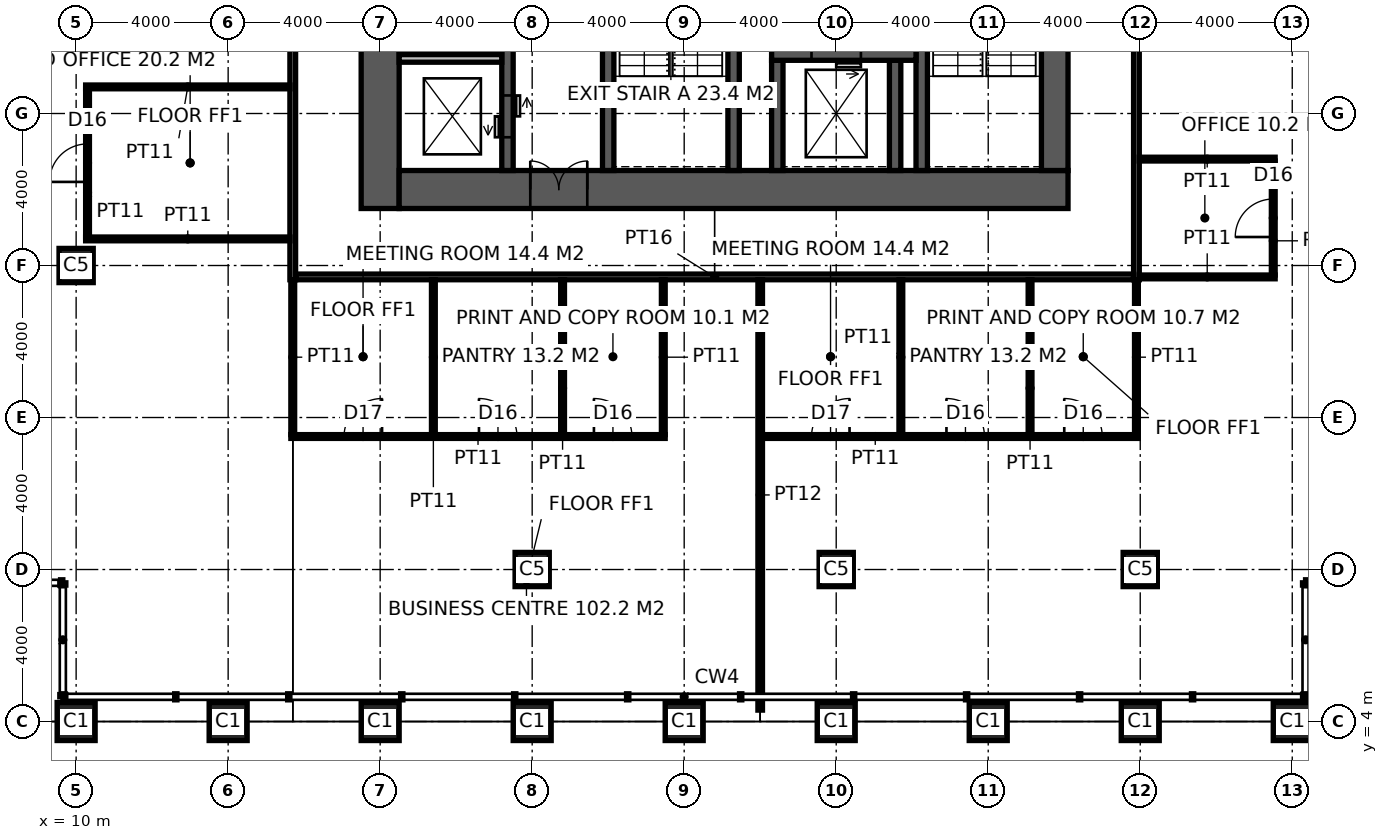
"""IFC4 building model, lengths in metres.
Left out: names, types, materials, properties, quantities, classifications, styles, units other than length and angle.
Written with IfcOpenShell. Run it as: python <this file> out.ifc"""

import sys

from ifc_helpers import new_model, si_unit, direction, frame, frame_2d, origin, origin_2d, place, context, subcontext, project, spatial, rectangle, hollow_rectangle, extrude, element, fill, save


model = new_model("IFC4")
c1 = context("Model", 3, precision=1e-05, world=origin(), true_north=direction((0.0, 1.0)))
c2 = subcontext(c1, "Body", "Model", "MODEL_VIEW")
j1 = project(units=[si_unit("LENGTHUNIT", "METRE"), si_unit("PLANEANGLEUNIT", "RADIAN")], contexts=[c1])
p1 = place(None, origin())
s1 = spatial("IfcSite", under=j1, at=p1, CompositionType="ELEMENT")
p2 = place(p1, origin())
s2 = spatial("IfcBuilding", under=s1, at=p2, CompositionType="ELEMENT")
p3 = place(p2, frame((0.0, 0.0, 142.8)))
s3 = spatial("IfcBuildingStorey", under=s2, at=p3, CompositionType="ELEMENT", Elevation=142.8)
for number, where, z_axis, x_axis in (
    (1, (10.0, 4.0, 0.0), (0.0, 0.0, 1.0), (1.0, 0.0, 0.0)),
    (2, (14.0, 4.0, 0.0), (0.0, 0.0, 1.0), (1.0, 0.0, 0.0)),
    (3, (18.0, 4.0, 0.0), (0.0, 0.0, 1.0), (1.0, 0.0, 0.0)),
    (4, (22.0, 4.0, 0.0), (0.0, 0.0, 1.0), (1.0, 0.0, 0.0)),
    (5, (26.0, 4.0, 0.0), (0.0, 0.0, 1.0), (1.0, 0.0, 0.0)),
    (6, (30.0, 4.0, 0.0), (0.0, 0.0, 1.0), (1.0, 0.0, 0.0)),
    (7, (34.0, 4.0, 0.0), (0.0, 0.0, 1.0), (1.0, 0.0, 0.0)),
    (8, (38.0, 4.0, 0.0), (0.0, 0.0, 1.0), (1.0, 0.0, 0.0)),
    (9, (42.0, 4.0, 0.0), (0.0, 0.0, 1.0), (1.0, 0.0, 0.0)),
):
    element("IfcColumn", number, at=place(p3, frame(where, z_axis=z_axis, x_axis=x_axis)), inside=s3, PredefinedType="COLUMN", context=c2, shape_type="SweptSolid", body=[
        extrude(hollow_rectangle(XDim=1.0, YDim=1.0, WallThickness=0.1, at=origin_2d()), origin(), (0.0, 0.0, 1.0), 5.0),
    ])
for number, where, z_axis, x_axis in (
    (10, (10.0, 16.0, 0.0), (0.0, 0.0, 1.0), (1.0, 0.0, 0.0)),
    (11, (22.0, 8.0, 0.0), (0.0, 0.0, 1.0), (1.0, 0.0, 0.0)),
    (12, (30.0, 8.0, 0.0), (0.0, 0.0, 1.0), (1.0, 0.0, 0.0)),
    (13, (38.0, 8.0, 0.0), (0.0, 0.0, 1.0), (1.0, 0.0, 0.0)),
):
    element("IfcColumn", number, at=place(p3, frame(where, z_axis=z_axis, x_axis=x_axis)), inside=s3, PredefinedType="COLUMN", context=c2, shape_type="SweptSolid", body=[
        extrude(hollow_rectangle(XDim=0.9, YDim=0.9, WallThickness=0.1, at=origin_2d()), origin(), (0.0, 0.0, 1.0), 5.0),
    ])
p4 = place(p3, frame((18.0, 17.5, -0.15), z_axis=(0.0, 0.0, 1.0), x_axis=(0.0, 1.0, 0.0)))
e14 = element("IfcWall", 14, at=p4, inside=s3, PredefinedType="SHEAR", context=c2, shape_type="SweptSolid", body=[
    extrude(rectangle(XDim=19.0, YDim=1.0, at=frame_2d((9.5, 0.0))), origin(), (0.0, 0.0, 1.0), 5.0),
])
p5 = place(p3, frame((18.5, 18.0, -0.15), z_axis=(0.0, 0.0, 1.0), x_axis=(1.0, 0.0, 0.0)))
e15 = element("IfcWall", 15, at=p5, inside=s3, PredefinedType="SHEAR", context=c2, shape_type="SweptSolid", body=[
    extrude(rectangle(XDim=17.6, YDim=1.0, at=frame_2d((8.8, 0.0))), origin(), (0.0, 0.0, 1.0), 5.0),
])
p6 = place(p5, frame((3.45, 0.0, 0.15)))
e16 = element("IfcOpeningElement", 16, at=p6, cuts=e15, PredefinedType="OPENING", context=c2, shape_type="SweptSolid", body=[
    extrude(rectangle(XDim=1.5, YDim=2.4, at=frame_2d((0.75, 1.2))), frame((0.0, 0.51, 0.0), z_axis=(0.0, -1.0, 0.0), x_axis=(1.0, 0.0, 0.0)), (0.0, 0.0, 1.0), 1.02),
])
p7 = place(p3, frame((35.75, 18.5, -0.15), z_axis=(0.0, 0.0, 1.0), x_axis=(0.0, 1.0, 0.0)))
e17 = element("IfcWall", 17, at=p7, inside=s3, PredefinedType="SHEAR", context=c2, shape_type="SweptSolid", body=[
    extrude(rectangle(XDim=17.0, YDim=0.7, at=frame_2d((8.5, 0.0))), origin(), (0.0, 0.0, 1.0), 5.0),
])
p8 = place(p7, frame((9.85, 0.0, 0.15)))
e18 = element("IfcOpeningElement", 18, at=p8, cuts=e17, PredefinedType="OPENING", context=c2, shape_type="SweptSolid", body=[
    extrude(rectangle(XDim=1.0, YDim=2.2, at=frame_2d((0.5, 1.1))), frame((0.0, 0.36, 0.0), z_axis=(0.0, -1.0, 0.0), x_axis=(1.0, 0.0, 0.0)), (0.0, 0.0, 1.0), 0.72),
])
p9 = place(p3, frame((24.0, 18.5, -0.15), z_axis=(0.0, 0.0, 1.0), x_axis=(0.0, 1.0, 0.0)))
e19 = element("IfcWall", 19, at=p9, inside=s3, PredefinedType="SHEAR", context=c2, shape_type="SweptSolid", body=[
    extrude(rectangle(XDim=17.0, YDim=0.3, at=frame_2d((8.5, 0.0))), origin(), (0.0, 0.0, 1.0), 5.0),
])
p10 = place(p9, frame((9.6, 0.0, 0.15)))
e20 = element("IfcOpeningElement", 20, at=p10, cuts=e19, PredefinedType="OPENING", context=c2, shape_type="SweptSolid", body=[
    extrude(rectangle(XDim=1.5, YDim=2.4, at=frame_2d((0.75, 1.2))), frame((0.0, 0.16, 0.0), z_axis=(0.0, -1.0, 0.0), x_axis=(1.0, 0.0, 0.0)), (0.0, 0.0, 1.0), 0.32),
])
p11 = place(p3, frame((27.3, 18.5, -0.15), z_axis=(0.0, 0.0, 1.0), x_axis=(0.0, 1.0, 0.0)))
e21 = element("IfcWall", 21, at=p11, inside=s3, PredefinedType="SHEAR", context=c2, shape_type="SweptSolid", body=[
    extrude(rectangle(XDim=7.9, YDim=0.3, at=frame_2d((3.95, 0.0))), origin(), (0.0, 0.0, 1.0), 5.0),
])
p12 = place(p11, frame((6.4, 0.0, 0.15)))
e22 = element("IfcOpeningElement", 22, at=p12, cuts=e21, PredefinedType="OPENING", context=c2, shape_type="SweptSolid", body=[
    extrude(rectangle(XDim=1.0, YDim=2.2, at=frame_2d((0.5, 1.1))), frame((0.0, 0.16, 0.0), z_axis=(0.0, -1.0, 0.0), x_axis=(1.0, 0.0, 0.0)), (0.0, 0.0, 1.0), 0.32),
])
p13 = place(p3, frame((32.25, 18.5, -0.15), z_axis=(0.0, 0.0, 1.0), x_axis=(0.0, 1.0, 0.0)))
e23 = element("IfcWall", 23, at=p13, inside=s3, PredefinedType="SHEAR", context=c2, shape_type="SweptSolid", body=[
    extrude(rectangle(XDim=7.9, YDim=0.3, at=frame_2d((3.95, 0.0))), origin(), (0.0, 0.0, 1.0), 5.0),
])
for number, where, z_axis, x_axis in (
    (24, (28.45, 18.5, -0.15), (0.0, 0.0, 1.0), (0.0, 1.0, 0.0)),
    (25, (31.55, 18.5, -0.15), (0.0, 0.0, 1.0), (0.0, 1.0, 0.0)),
):
    element("IfcWall", number, at=place(p3, frame(where, z_axis=z_axis, x_axis=x_axis)), inside=s3, PredefinedType="SHEAR", context=c2, shape_type="SweptSolid", body=[
        extrude(rectangle(XDim=2.9, YDim=0.3, at=frame_2d((1.45, 0.0))), origin(), (0.0, 0.0, 1.0), 5.0),
    ])
p14 = place(p3, frame((28.3, 21.55, -0.15), z_axis=(0.0, 0.0, 1.0), x_axis=(1.0, 0.0, 0.0)))
e26 = element("IfcWall", 26, at=p14, inside=s3, PredefinedType="SHEAR", context=c2, shape_type="SweptSolid", body=[
    extrude(rectangle(XDim=3.8, YDim=0.3, at=frame_2d((1.9, 0.0))), origin(), (0.0, 0.0, 1.0), 5.0),
])
p15 = place(p14, frame((1.05, 0.0, 0.15)))
e27 = element("IfcOpeningElement", 27, at=p15, cuts=e26, PredefinedType="OPENING", context=c2, shape_type="SweptSolid", body=[
    extrude(rectangle(XDim=1.3, YDim=2.4, at=frame_2d((0.65, 1.2))), frame((0.0, 0.16, 0.0), z_axis=(0.0, -1.0, 0.0), x_axis=(1.0, 0.0, 0.0)), (0.0, 0.0, 1.0), 0.32),
])
p16 = place(p3, frame((21.35, 18.5, -0.15), z_axis=(0.0, 0.0, 1.0), x_axis=(0.0, 1.0, 0.0)))
e28 = element("IfcWall", 28, at=p16, inside=s3, PredefinedType="SHEAR", context=c2, shape_type="SweptSolid", body=[
    extrude(rectangle(XDim=12.5, YDim=0.3, at=frame_2d((6.25, 0.0))), origin(), (0.0, 0.0, 1.0), 5.0),
])
p17 = place(p16, frame((0.875, 0.0, 0.15)))
e29 = element("IfcOpeningElement", 29, at=p17, cuts=e28, PredefinedType="OPENING", context=c2, shape_type="SweptSolid", body=[
    extrude(rectangle(XDim=1.1, YDim=2.2, at=frame_2d((0.55, 1.1))), frame((0.0, 0.16, 0.0), z_axis=(0.0, -1.0, 0.0), x_axis=(1.0, 0.0, 0.0)), (0.0, 0.0, 1.0), 0.32),
])
p18 = place(p16, frame((3.825, 0.0, 0.15)))
e30 = element("IfcOpeningElement", 30, at=p18, cuts=e28, PredefinedType="OPENING", context=c2, shape_type="SweptSolid", body=[
    extrude(rectangle(XDim=1.1, YDim=2.2, at=frame_2d((0.55, 1.1))), frame((0.0, 0.16, 0.0), z_axis=(0.0, -1.0, 0.0), x_axis=(1.0, 0.0, 0.0)), (0.0, 0.0, 1.0), 0.32),
])
p19 = place(p16, frame((6.675, 0.0, 0.15)))
e31 = element("IfcOpeningElement", 31, at=p19, cuts=e28, PredefinedType="OPENING", context=c2, shape_type="SweptSolid", body=[
    extrude(rectangle(XDim=1.1, YDim=2.2, at=frame_2d((0.55, 1.1))), frame((0.0, 0.16, 0.0), z_axis=(0.0, -1.0, 0.0), x_axis=(1.0, 0.0, 0.0)), (0.0, 0.0, 1.0), 0.32),
])
p20 = place(p16, frame((9.575, 0.0, 0.15)))
e32 = element("IfcOpeningElement", 32, at=p20, cuts=e28, PredefinedType="OPENING", context=c2, shape_type="SweptSolid", body=[
    extrude(rectangle(XDim=1.1, YDim=2.2, at=frame_2d((0.55, 1.1))), frame((0.0, 0.16, 0.0), z_axis=(0.0, -1.0, 0.0), x_axis=(1.0, 0.0, 0.0)), (0.0, 0.0, 1.0), 0.32),
])
p21 = place(p3, frame((18.5, 21.45, -0.15), z_axis=(0.0, 0.0, 1.0), x_axis=(1.0, 0.0, 0.0)))
e33 = element("IfcWall", 33, at=p21, inside=s3, PredefinedType="SOLIDWALL", context=c2, shape_type="SweptSolid", body=[
    extrude(rectangle(XDim=2.7, YDim=0.2, at=frame_2d((1.35, 0.0))), origin(), (0.0, 0.0, 1.0), 5.0),
])
p22 = place(p3, frame((15.7, 15.625, 0.0), z_axis=(0.0, 0.0, 1.0), x_axis=(0.0, 1.0, 0.0)))
e34 = element("IfcWall", 34, at=p22, inside=s3, PredefinedType="PARTITIONING", context=c2, shape_type="SweptSolid", body=[
    extrude(rectangle(XDim=22.75, YDim=0.15, at=frame_2d((11.375, 0.0))), origin(), (0.0, 0.0, 1.0), 4.85),
])
p23 = place(p22, frame((10.575, 0.0, 0.0)))
e35 = element("IfcOpeningElement", 35, at=p23, cuts=e34, PredefinedType="OPENING", context=c2, shape_type="SweptSolid", body=[
    extrude(rectangle(XDim=1.6, YDim=2.7, at=frame_2d((0.8, 1.35))), frame((0.0, 0.085, 0.0), z_axis=(0.0, -1.0, 0.0), x_axis=(1.0, 0.0, 0.0)), (0.0, 0.0, 1.0), 0.17),
])
p24 = place(p3, frame((37.9, 15.625, 0.0), z_axis=(0.0, 0.0, 1.0), x_axis=(0.0, 1.0, 0.0)))
e36 = element("IfcWall", 36, at=p24, inside=s3, PredefinedType="PARTITIONING", context=c2, shape_type="SweptSolid", body=[
    extrude(rectangle(XDim=22.75, YDim=0.15, at=frame_2d((11.375, 0.0))), origin(), (0.0, 0.0, 1.0), 3.95),
])
p25 = place(p24, frame((10.475, 0.0, 0.0)))
e37 = element("IfcOpeningElement", 37, at=p25, cuts=e36, PredefinedType="OPENING", context=c2, shape_type="SweptSolid", body=[
    extrude(rectangle(XDim=1.8, YDim=2.4, at=frame_2d((0.9, 1.2))), frame((0.0, 0.085, 0.0), z_axis=(0.0, -1.0, 0.0), x_axis=(1.0, 0.0, 0.0)), (0.0, 0.0, 1.0), 0.17),
])
p26 = place(p3, frame((15.775, 15.7, 0.0), z_axis=(0.0, 0.0, 1.0), x_axis=(1.0, 0.0, 0.0)))
e38 = element("IfcWall", 38, at=p26, inside=s3, PredefinedType="PARTITIONING", context=c2, shape_type="SweptSolid", body=[
    extrude(rectangle(XDim=22.05, YDim=0.15, at=frame_2d((11.025, 0.0))), origin(), (0.0, 0.0, 1.0), 4.85),
])
p27 = place(p3, frame((28.0, 4.3, 0.0), z_axis=(0.0, 0.0, 1.0), x_axis=(0.0, 1.0, 0.0)))
e39 = element("IfcWall", 39, at=p27, inside=s3, PredefinedType="PARTITIONING", context=c2, shape_type="SweptSolid", body=[
    extrude(rectangle(XDim=11.325, YDim=0.12, at=frame_2d((5.663, 0.0))), origin(), (0.0, 0.0, 1.0), 4.85),
])
p28 = place(p3, frame((15.65, 11.5, 0.0), z_axis=(0.0, 0.0, 1.0), x_axis=(1.0, 0.0, 0.0)))
e40 = element("IfcWall", 40, at=p28, inside=s3, PredefinedType="PARTITIONING", context=c2, shape_type="SweptSolid", body=[
    extrude(rectangle(XDim=9.85, YDim=0.1, at=frame_2d((4.925, 0.0))), origin(), (0.0, 0.0, 1.0), 4.85),
])
p29 = place(p28, frame((1.4, 0.0, 0.0)))
e41 = element("IfcOpeningElement", 41, at=p29, cuts=e40, PredefinedType="OPENING", context=c2, shape_type="SweptSolid", body=[
    extrude(rectangle(XDim=1.0, YDim=2.2, at=frame_2d((0.5, 1.1))), frame((0.0, 0.06, 0.0), z_axis=(0.0, -1.0, 0.0), x_axis=(1.0, 0.0, 0.0)), (0.0, 0.0, 1.0), 0.12),
])
p30 = place(p28, frame((4.95, 0.0, 0.0)))
e42 = element("IfcOpeningElement", 42, at=p30, cuts=e40, PredefinedType="OPENING", context=c2, shape_type="SweptSolid", body=[
    extrude(rectangle(XDim=1.0, YDim=2.2, at=frame_2d((0.5, 1.1))), frame((0.0, 0.06, 0.0), z_axis=(0.0, -1.0, 0.0), x_axis=(1.0, 0.0, 0.0)), (0.0, 0.0, 1.0), 0.12),
])
p31 = place(p28, frame((7.975, 0.0, 0.0)))
e43 = element("IfcOpeningElement", 43, at=p31, cuts=e40, PredefinedType="OPENING", context=c2, shape_type="SweptSolid", body=[
    extrude(rectangle(XDim=1.0, YDim=2.2, at=frame_2d((0.5, 1.1))), frame((0.0, 0.06, 0.0), z_axis=(0.0, -1.0, 0.0), x_axis=(1.0, 0.0, 0.0)), (0.0, 0.0, 1.0), 0.12),
])
p32 = place(p3, frame((28.061, 11.5, 0.0), z_axis=(0.0, 0.0, 1.0), x_axis=(1.0, 0.0, 0.0)))
e44 = element("IfcWall", 44, at=p32, inside=s3, PredefinedType="PARTITIONING", context=c2, shape_type="SweptSolid", body=[
    extrude(rectangle(XDim=9.889, YDim=0.1, at=frame_2d((4.944, 0.0))), origin(), (0.0, 0.0, 1.0), 4.85),
])
p33 = place(p32, frame((1.29, 0.0, 0.0)))
e45 = element("IfcOpeningElement", 45, at=p33, cuts=e44, PredefinedType="OPENING", context=c2, shape_type="SweptSolid", body=[
    extrude(rectangle(XDim=1.0, YDim=2.2, at=frame_2d((0.5, 1.1))), frame((0.0, 0.06, 0.0), z_axis=(0.0, -1.0, 0.0), x_axis=(1.0, 0.0, 0.0)), (0.0, 0.0, 1.0), 0.12),
])
p34 = place(p32, frame((4.84, 0.0, 0.0)))
e46 = element("IfcOpeningElement", 46, at=p34, cuts=e44, PredefinedType="OPENING", context=c2, shape_type="SweptSolid", body=[
    extrude(rectangle(XDim=1.0, YDim=2.2, at=frame_2d((0.5, 1.1))), frame((0.0, 0.06, 0.0), z_axis=(0.0, -1.0, 0.0), x_axis=(1.0, 0.0, 0.0)), (0.0, 0.0, 1.0), 0.12),
])
p35 = place(p32, frame((7.939, 0.0, 0.0)))
e47 = element("IfcOpeningElement", 47, at=p35, cuts=e44, PredefinedType="OPENING", context=c2, shape_type="SweptSolid", body=[
    extrude(rectangle(XDim=1.0, YDim=2.2, at=frame_2d((0.5, 1.1))), frame((0.0, 0.06, 0.0), z_axis=(0.0, -1.0, 0.0), x_axis=(1.0, 0.0, 0.0)), (0.0, 0.0, 1.0), 0.12),
])
p36 = place(p3, frame((37.975, 15.7, 0.0), z_axis=(0.0, 0.0, 1.0), x_axis=(1.0, 0.0, 0.0)))
e48 = element("IfcWall", 48, at=p36, inside=s3, PredefinedType="PARTITIONING", context=c2, shape_type="SweptSolid", body=[
    extrude(rectangle(XDim=3.575, YDim=0.1, at=frame_2d((1.788, 0.0))), origin(), (0.0, 0.0, 1.0), 4.85),
])
p37 = place(p3, frame((10.25, 16.7, 0.0), z_axis=(0.0, 0.0, 1.0), x_axis=(1.0, 0.0, 0.0)))
e49 = element("IfcWall", 49, at=p37, inside=s3, PredefinedType="PARTITIONING", context=c2, shape_type="SweptSolid", body=[
    extrude(rectangle(XDim=5.375, YDim=0.1, at=frame_2d((2.688, 0.0))), origin(), (0.0, 0.0, 1.0), 4.85),
])
p38 = place(p3, frame((37.975, 18.8, 0.0), z_axis=(0.0, 0.0, 1.0), x_axis=(1.0, 0.0, 0.0)))
e50 = element("IfcWall", 50, at=p38, inside=s3, PredefinedType="PARTITIONING", context=c2, shape_type="SweptSolid", body=[
    extrude(rectangle(XDim=3.575, YDim=0.1, at=frame_2d((1.788, 0.0))), origin(), (0.0, 0.0, 1.0), 4.85),
])
p39 = place(p3, frame((10.25, 20.7, 0.0), z_axis=(0.0, 0.0, 1.0), x_axis=(1.0, 0.0, 0.0)))
e51 = element("IfcWall", 51, at=p39, inside=s3, PredefinedType="PARTITIONING", context=c2, shape_type="SweptSolid", body=[
    extrude(rectangle(XDim=5.375, YDim=0.1, at=frame_2d((2.688, 0.0))), origin(), (0.0, 0.0, 1.0), 4.85),
])
p40 = place(p3, frame((10.3, 16.75, 0.0), z_axis=(0.0, 0.0, 1.0), x_axis=(0.0, 1.0, 0.0)))
e52 = element("IfcWall", 52, at=p40, inside=s3, PredefinedType="PARTITIONING", context=c2, shape_type="SweptSolid", body=[
    extrude(rectangle(XDim=3.9, YDim=0.1, at=frame_2d((1.95, 0.0))), origin(), (0.0, 0.0, 1.0), 3.95),
])
p41 = place(p40, frame((1.45, 0.0, 0.0)))
e53 = element("IfcOpeningElement", 53, at=p41, cuts=e52, PredefinedType="OPENING", context=c2, shape_type="SweptSolid", body=[
    extrude(rectangle(XDim=1.0, YDim=2.2, at=frame_2d((0.5, 1.1))), frame((0.0, 0.06, 0.0), z_axis=(0.0, -1.0, 0.0), x_axis=(1.0, 0.0, 0.0)), (0.0, 0.0, 1.0), 0.12),
])
for number, where, z_axis, x_axis in (
    (54, (15.7, 11.55, 0.0), (0.0, 0.0, 1.0), (0.0, 1.0, 0.0)),
    (55, (19.4, 11.55, 0.0), (0.0, 0.0, 1.0), (0.0, 1.0, 0.0)),
    (56, (22.8, 11.55, 0.0), (0.0, 0.0, 1.0), (0.0, 1.0, 0.0)),
    (57, (25.45, 11.55, 0.0), (0.0, 0.0, 1.0), (0.0, 1.0, 0.0)),
    (58, (31.701, 11.55, 0.0), (0.0, 0.0, 1.0), (0.0, 1.0, 0.0)),
    (59, (35.101, 11.55, 0.0), (0.0, 0.0, 1.0), (0.0, 1.0, 0.0)),
):
    element("IfcWall", number, at=place(p3, frame(where, z_axis=z_axis, x_axis=x_axis)), inside=s3, PredefinedType="PARTITIONING", context=c2, shape_type="SweptSolid", body=[
        extrude(rectangle(XDim=4.075, YDim=0.1, at=frame_2d((2.038, 0.0))), origin(), (0.0, 0.0, 1.0), 4.85),
    ])
p42 = place(p3, frame((37.9, 11.55, 0.0), z_axis=(0.0, 0.0, 1.0), x_axis=(0.0, 1.0, 0.0)))
e60 = element("IfcWall", 60, at=p42, inside=s3, PredefinedType="PARTITIONING", context=c2, shape_type="SweptSolid", body=[
    extrude(rectangle(XDim=4.075, YDim=0.1, at=frame_2d((2.038, 0.0))), origin(), (0.0, 0.0, 1.0), 3.95),
])
p43 = place(p3, frame((41.5, 15.75, 0.0), z_axis=(0.0, 0.0, 1.0), x_axis=(0.0, 1.0, 0.0)))
e61 = element("IfcWall", 61, at=p43, inside=s3, PredefinedType="PARTITIONING", context=c2, shape_type="SweptSolid", body=[
    extrude(rectangle(XDim=3.0, YDim=0.1, at=frame_2d((1.5, 0.0))), origin(), (0.0, 0.0, 1.0), 4.85),
])
p44 = place(p43, frame((1.0, 0.0, 0.0)))
e62 = element("IfcOpeningElement", 62, at=p44, cuts=e61, PredefinedType="OPENING", context=c2, shape_type="SweptSolid", body=[
    extrude(rectangle(XDim=1.0, YDim=2.2, at=frame_2d((0.5, 1.1))), frame((0.0, 0.06, 0.0), z_axis=(0.0, -1.0, 0.0), x_axis=(1.0, 0.0, 0.0)), (0.0, 0.0, 1.0), 0.12),
])
p45 = place(p6, origin())
e63 = element("IfcDoor", 63, at=p45, inside=s3, OperationType="DOUBLE_DOOR_DOUBLE_SWING", PredefinedType="DOOR", context=c2, shape_type="SweptSolid", body=[
    extrude(rectangle(XDim=1.5, YDim=2.4, at=frame_2d((0.75, 1.2))), frame((0.0, 0.025, 0.0), z_axis=(0.0, -1.0, 0.0), x_axis=(1.0, 0.0, 0.0)), (0.0, 0.0, 1.0), 0.05),
])
fill(e16, e63)
p46 = place(p29, origin())
e64 = element("IfcDoor", 64, at=p46, inside=s3, OperationType="SINGLE_SWING_RIGHT", PredefinedType="DOOR", context=c2, shape_type="SweptSolid", body=[
    extrude(rectangle(XDim=1.0, YDim=2.2, at=frame_2d((0.5, 1.1))), frame((0.0, 0.025, 0.0), z_axis=(0.0, -1.0, 0.0), x_axis=(1.0, 0.0, 0.0)), (0.0, 0.0, 1.0), 0.05),
])
fill(e41, e64)
p47 = place(p30, origin())
e65 = element("IfcDoor", 65, at=p47, inside=s3, OperationType="SINGLE_SWING_LEFT", PredefinedType="DOOR", context=c2, shape_type="SweptSolid", body=[
    extrude(rectangle(XDim=1.0, YDim=2.2, at=frame_2d((0.5, 1.1))), frame((0.0, 0.025, 0.0), z_axis=(0.0, -1.0, 0.0), x_axis=(1.0, 0.0, 0.0)), (0.0, 0.0, 1.0), 0.05),
])
fill(e42, e65)
p48 = place(p31, origin())
e66 = element("IfcDoor", 66, at=p48, inside=s3, OperationType="SINGLE_SWING_LEFT", PredefinedType="DOOR", context=c2, shape_type="SweptSolid", body=[
    extrude(rectangle(XDim=1.0, YDim=2.2, at=frame_2d((0.5, 1.1))), frame((0.0, 0.025, 0.0), z_axis=(0.0, -1.0, 0.0), x_axis=(1.0, 0.0, 0.0)), (0.0, 0.0, 1.0), 0.05),
])
fill(e43, e66)
p49 = place(p41, origin())
e67 = element("IfcDoor", 67, at=p49, inside=s3, OperationType="SINGLE_SWING_LEFT", PredefinedType="DOOR", context=c2, shape_type="SweptSolid", body=[
    extrude(rectangle(XDim=1.0, YDim=2.2, at=frame_2d((0.5, 1.1))), frame((0.0, 0.025, 0.0), z_axis=(0.0, -1.0, 0.0), x_axis=(1.0, 0.0, 0.0)), (0.0, 0.0, 1.0), 0.05),
])
fill(e53, e67)
p50 = place(p33, origin())
e68 = element("IfcDoor", 68, at=p50, inside=s3, OperationType="SINGLE_SWING_RIGHT", PredefinedType="DOOR", context=c2, shape_type="SweptSolid", body=[
    extrude(rectangle(XDim=1.0, YDim=2.2, at=frame_2d((0.5, 1.1))), frame((0.0, 0.025, 0.0), z_axis=(0.0, -1.0, 0.0), x_axis=(1.0, 0.0, 0.0)), (0.0, 0.0, 1.0), 0.05),
])
fill(e45, e68)
p51 = place(p34, origin())
e69 = element("IfcDoor", 69, at=p51, inside=s3, OperationType="SINGLE_SWING_LEFT", PredefinedType="DOOR", context=c2, shape_type="SweptSolid", body=[
    extrude(rectangle(XDim=1.0, YDim=2.2, at=frame_2d((0.5, 1.1))), frame((0.0, 0.025, 0.0), z_axis=(0.0, -1.0, 0.0), x_axis=(1.0, 0.0, 0.0)), (0.0, 0.0, 1.0), 0.05),
])
fill(e46, e69)
p52 = place(p35, origin())
e70 = element("IfcDoor", 70, at=p52, inside=s3, OperationType="SINGLE_SWING_LEFT", PredefinedType="DOOR", context=c2, shape_type="SweptSolid", body=[
    extrude(rectangle(XDim=1.0, YDim=2.2, at=frame_2d((0.5, 1.1))), frame((0.0, 0.025, 0.0), z_axis=(0.0, -1.0, 0.0), x_axis=(1.0, 0.0, 0.0)), (0.0, 0.0, 1.0), 0.05),
])
fill(e47, e70)
p53 = place(p44, origin())
e71 = element("IfcDoor", 71, at=p53, inside=s3, OperationType="SINGLE_SWING_LEFT", PredefinedType="DOOR", context=c2, shape_type="SweptSolid", body=[
    extrude(rectangle(XDim=1.0, YDim=2.2, at=frame_2d((0.5, 1.1))), frame((0.0, 0.025, 0.0), z_axis=(0.0, -1.0, 0.0), x_axis=(1.0, 0.0, 0.0)), (0.0, 0.0, 1.0), 0.05),
])
fill(e62, e71)
p54 = place(p15, origin())
e72 = element("IfcDoor", 72, at=p54, inside=s3, OperationType="DOUBLE_DOOR_SLIDING", PredefinedType="DOOR", context=c2, shape_type="SweptSolid", body=[
    extrude(rectangle(XDim=1.3, YDim=2.4, at=frame_2d((0.65, 1.2))), frame((0.0, 0.025, 0.0), z_axis=(0.0, -1.0, 0.0), x_axis=(1.0, 0.0, 0.0)), (0.0, 0.0, 1.0), 0.05),
])
fill(e27, e72)
p55 = place(p17, origin())
e73 = element("IfcDoor", 73, at=p55, inside=s3, OperationType="DOUBLE_DOOR_SLIDING", PredefinedType="DOOR", context=c2, shape_type="SweptSolid", body=[
    extrude(rectangle(XDim=1.1, YDim=2.2, at=frame_2d((0.55, 1.1))), frame((0.0, 0.025, 0.0), z_axis=(0.0, -1.0, 0.0), x_axis=(1.0, 0.0, 0.0)), (0.0, 0.0, 1.0), 0.05),
])
fill(e29, e73)
save(model, sys.argv[1])
